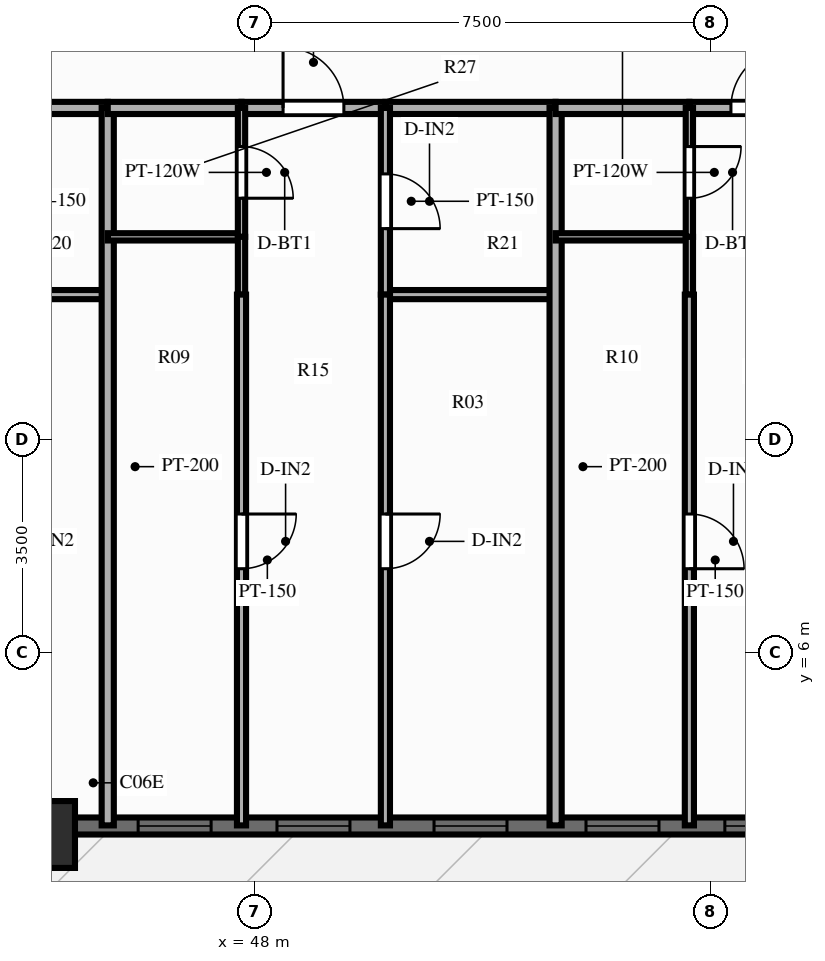
"""IFC4 building model, lengths in metres.
Left out: names, types, materials, properties, quantities, classifications, styles, units other than length and angle.
Written with IfcOpenShell. Run it as: python <this file> out.ifc"""

import sys

from ifc_helpers import new_model, si_unit, direction, frame, frame_2d, origin, origin_2d, place, context, subcontext, project, spatial, rectangle, extrude, source, transform, mapped, element, fill, save


model = new_model("IFC4")
c1 = context("Model", 3, precision=1e-05, world=origin(), true_north=direction((0.0, 1.0)))
c2 = subcontext(c1, "Body", "Model", "MODEL_VIEW")
j1 = project(units=[si_unit("LENGTHUNIT", "METRE"), si_unit("PLANEANGLEUNIT", "RADIAN")], contexts=[c1])
p1 = place(None, origin())
s1 = spatial("IfcSite", under=j1, at=p1, CompositionType="ELEMENT")
p2 = place(p1, origin())
s2 = spatial("IfcBuilding", under=s1, at=p2, CompositionType="ELEMENT")
p3 = place(p2, frame((0.0, 0.0, 22.4)))
s3 = spatial("IfcBuildingStorey", under=s2, at=p3, CompositionType="ELEMENT", Elevation=22.4)
m1 = source(origin(), c2, "Body", "SweptSolid", [
    extrude(rectangle(XDim=1.1, YDim=1.1, at=origin_2d()), origin(), (0.0, 0.0, 1.0), 3.0),
])
p4 = place(p3, frame((44.5, 3.0, 0.0), z_axis=(0.0, 0.0, 1.0), x_axis=(1.0, 0.0, 0.0)))
e1 = element("IfcColumn", 1, at=p4, inside=s3, PredefinedType="COLUMN", context=c2, shape_type="MappedRepresentation", body=[
    mapped(m1, transform((0.0, 0.0, 0.0), scale=1.0)),
])
p5 = place(p3, frame((15.5, 3.14, 0.0), z_axis=(0.0, 0.0, 1.0), x_axis=(1.0, 0.0, 0.0)))
e2 = element("IfcWall", 2, at=p5, inside=s3, PredefinedType="SOLIDWALL", context=c2, shape_type="SweptSolid", body=[
    extrude(rectangle(XDim=45.0, YDim=0.28, at=frame_2d((22.5, 0.0))), origin(), (0.0, 0.0, 1.0), 2.28),
])
p6 = place(p5, frame((0.785, 0.0, 0.25)))
e3 = element("IfcOpeningElement", 3, at=p6, cuts=e2, PredefinedType="OPENING", context=c2, shape_type="SweptSolid", body=[
    extrude(rectangle(XDim=1.2, YDim=1.5, at=frame_2d((0.6, 0.75))), frame((0.0, 0.152, 0.0), z_axis=(0.0, -1.0, 0.0), x_axis=(1.0, 0.0, 0.0)), (0.0, 0.0, 1.0), 0.304),
])
p7 = place(p5, frame((3.033, 0.0, 0.25)))
e4 = element("IfcOpeningElement", 4, at=p7, cuts=e2, PredefinedType="OPENING", context=c2, shape_type="SweptSolid", body=[
    extrude(rectangle(XDim=1.2, YDim=1.5, at=frame_2d((0.6, 0.75))), frame((0.0, 0.152, 0.0), z_axis=(0.0, -1.0, 0.0), x_axis=(1.0, 0.0, 0.0)), (0.0, 0.0, 1.0), 0.304),
])
p8 = place(p5, frame((5.727, 0.0, 0.25)))
e5 = element("IfcOpeningElement", 5, at=p8, cuts=e2, PredefinedType="OPENING", context=c2, shape_type="SweptSolid", body=[
    extrude(rectangle(XDim=1.2, YDim=1.5, at=frame_2d((0.6, 0.75))), frame((0.0, 0.152, 0.0), z_axis=(0.0, -1.0, 0.0), x_axis=(1.0, 0.0, 0.0)), (0.0, 0.0, 1.0), 0.304),
])
p9 = place(p5, frame((8.269, 0.0, 0.25)))
e6 = element("IfcOpeningElement", 6, at=p9, cuts=e2, PredefinedType="OPENING", context=c2, shape_type="SweptSolid", body=[
    extrude(rectangle(XDim=1.2, YDim=1.5, at=frame_2d((0.6, 0.75))), frame((0.0, 0.152, 0.0), z_axis=(0.0, -1.0, 0.0), x_axis=(1.0, 0.0, 0.0)), (0.0, 0.0, 1.0), 0.304),
])
p10 = place(p5, frame((10.621, 0.0, 0.25)))
e7 = element("IfcOpeningElement", 7, at=p10, cuts=e2, PredefinedType="OPENING", context=c2, shape_type="SweptSolid", body=[
    extrude(rectangle(XDim=1.2, YDim=1.5, at=frame_2d((0.6, 0.75))), frame((0.0, 0.152, 0.0), z_axis=(0.0, -1.0, 0.0), x_axis=(1.0, 0.0, 0.0)), (0.0, 0.0, 1.0), 0.304),
])
p11 = place(p5, frame((13.316, 0.0, 0.25)))
e8 = element("IfcOpeningElement", 8, at=p11, cuts=e2, PredefinedType="OPENING", context=c2, shape_type="SweptSolid", body=[
    extrude(rectangle(XDim=1.2, YDim=1.5, at=frame_2d((0.6, 0.75))), frame((0.0, 0.152, 0.0), z_axis=(0.0, -1.0, 0.0), x_axis=(1.0, 0.0, 0.0)), (0.0, 0.0, 1.0), 0.304),
])
p12 = place(p5, frame((16.624, 0.0, 0.25)))
e9 = element("IfcOpeningElement", 9, at=p12, cuts=e2, PredefinedType="OPENING", context=c2, shape_type="SweptSolid", body=[
    extrude(rectangle(XDim=0.7, YDim=1.5, at=frame_2d((0.35, 0.75))), frame((0.0, 0.152, 0.0), z_axis=(0.0, -1.0, 0.0), x_axis=(1.0, 0.0, 0.0)), (0.0, 0.0, 1.0), 0.304),
])
p13 = place(p5, frame((18.141, 0.0, 0.25)))
e10 = element("IfcOpeningElement", 10, at=p13, cuts=e2, PredefinedType="OPENING", context=c2, shape_type="SweptSolid", body=[
    extrude(rectangle(XDim=1.2, YDim=1.5, at=frame_2d((0.6, 0.75))), frame((0.0, 0.152, 0.0), z_axis=(0.0, -1.0, 0.0), x_axis=(1.0, 0.0, 0.0)), (0.0, 0.0, 1.0), 0.304),
])
p14 = place(p5, frame((21.874, 0.0, 0.0), z_axis=(0.0, 0.0, 1.0), x_axis=(-1.0, 0.0, 0.0)))
e11 = element("IfcOpeningElement", 11, at=p14, cuts=e2, PredefinedType="OPENING", context=c2, shape_type="SweptSolid", body=[
    extrude(rectangle(XDim=1.1, YDim=2.15, at=frame_2d((0.55, 1.075))), frame((0.0, 0.152, 0.0), z_axis=(0.0, -1.0, 0.0), x_axis=(1.0, 0.0, 0.0)), (0.0, 0.0, 1.0), 0.304),
])
p15 = place(p5, frame((23.223, 0.0, 0.25)))
e12 = element("IfcOpeningElement", 12, at=p15, cuts=e2, PredefinedType="OPENING", context=c2, shape_type="SweptSolid", body=[
    extrude(rectangle(XDim=1.2, YDim=1.5, at=frame_2d((0.6, 0.75))), frame((0.0, 0.152, 0.0), z_axis=(0.0, -1.0, 0.0), x_axis=(1.0, 0.0, 0.0)), (0.0, 0.0, 1.0), 0.304),
])
p16 = place(p5, frame((25.507, 0.0, 0.25)))
e13 = element("IfcOpeningElement", 13, at=p16, cuts=e2, PredefinedType="OPENING", context=c2, shape_type="SweptSolid", body=[
    extrude(rectangle(XDim=1.2, YDim=1.5, at=frame_2d((0.6, 0.75))), frame((0.0, 0.152, 0.0), z_axis=(0.0, -1.0, 0.0), x_axis=(1.0, 0.0, 0.0)), (0.0, 0.0, 1.0), 0.304),
])
p17 = place(p5, frame((27.6, 0.0, 0.25)))
e14 = element("IfcOpeningElement", 14, at=p17, cuts=e2, PredefinedType="OPENING", context=c2, shape_type="SweptSolid", body=[
    extrude(rectangle(XDim=0.7, YDim=1.5, at=frame_2d((0.35, 0.75))), frame((0.0, 0.152, 0.0), z_axis=(0.0, -1.0, 0.0), x_axis=(1.0, 0.0, 0.0)), (0.0, 0.0, 1.0), 0.304),
])
p18 = place(p5, frame((30.589, 0.0, 0.25)))
e15 = element("IfcOpeningElement", 15, at=p18, cuts=e2, PredefinedType="OPENING", context=c2, shape_type="SweptSolid", body=[
    extrude(rectangle(XDim=1.2, YDim=1.5, at=frame_2d((0.6, 0.75))), frame((0.0, 0.152, 0.0), z_axis=(0.0, -1.0, 0.0), x_axis=(1.0, 0.0, 0.0)), (0.0, 0.0, 1.0), 0.304),
])
p19 = place(p5, frame((32.872, 0.0, 0.25)))
e16 = element("IfcOpeningElement", 16, at=p19, cuts=e2, PredefinedType="OPENING", context=c2, shape_type="SweptSolid", body=[
    extrude(rectangle(XDim=1.2, YDim=1.5, at=frame_2d((0.6, 0.75))), frame((0.0, 0.152, 0.0), z_axis=(0.0, -1.0, 0.0), x_axis=(1.0, 0.0, 0.0)), (0.0, 0.0, 1.0), 0.304),
])
p20 = place(p5, frame((35.455, 0.0, 0.25)))
e17 = element("IfcOpeningElement", 17, at=p20, cuts=e2, PredefinedType="OPENING", context=c2, shape_type="SweptSolid", body=[
    extrude(rectangle(XDim=1.2, YDim=1.5, at=frame_2d((0.6, 0.75))), frame((0.0, 0.152, 0.0), z_axis=(0.0, -1.0, 0.0), x_axis=(1.0, 0.0, 0.0)), (0.0, 0.0, 1.0), 0.304),
])
p21 = place(p5, frame((37.954, 0.0, 0.25)))
e18 = element("IfcOpeningElement", 18, at=p21, cuts=e2, PredefinedType="OPENING", context=c2, shape_type="SweptSolid", body=[
    extrude(rectangle(XDim=1.2, YDim=1.5, at=frame_2d((0.6, 0.75))), frame((0.0, 0.152, 0.0), z_axis=(0.0, -1.0, 0.0), x_axis=(1.0, 0.0, 0.0)), (0.0, 0.0, 1.0), 0.304),
])
p22 = place(p5, frame((40.238, 0.0, 0.25)))
e19 = element("IfcOpeningElement", 19, at=p22, cuts=e2, PredefinedType="OPENING", context=c2, shape_type="SweptSolid", body=[
    extrude(rectangle(XDim=1.2, YDim=1.5, at=frame_2d((0.6, 0.75))), frame((0.0, 0.152, 0.0), z_axis=(0.0, -1.0, 0.0), x_axis=(1.0, 0.0, 0.0)), (0.0, 0.0, 1.0), 0.304),
])
p23 = place(p5, frame((42.716, 0.0, 0.25)))
e20 = element("IfcOpeningElement", 20, at=p23, cuts=e2, PredefinedType="OPENING", context=c2, shape_type="SweptSolid", body=[
    extrude(rectangle(XDim=1.2, YDim=1.5, at=frame_2d((0.6, 0.75))), frame((0.0, 0.152, 0.0), z_axis=(0.0, -1.0, 0.0), x_axis=(1.0, 0.0, 0.0)), (0.0, 0.0, 1.0), 0.304),
])
p24 = place(p3, frame((42.79, 14.95, 0.0), z_axis=(0.0, 0.0, 1.0), x_axis=(1.0, 0.0, 0.0)))
e21 = element("IfcWall", 21, at=p24, inside=s3, PredefinedType="PARTITIONING", context=c2, shape_type="SweptSolid", body=[
    extrude(rectangle(XDim=2.799, YDim=0.2, at=frame_2d((1.399, 0.0))), origin(), (0.0, 0.0, 1.0), 2.79),
])
p25 = place(p3, frame((42.79, 11.88, 0.0), z_axis=(0.0, 0.0, 1.0), x_axis=(1.0, 0.0, 0.0)))
e22 = element("IfcWall", 22, at=p25, inside=s3, PredefinedType="PARTITIONING", context=c2, shape_type="SweptSolid", body=[
    extrude(rectangle(XDim=2.799, YDim=0.15, at=frame_2d((1.399, 0.0))), origin(), (0.0, 0.0, 1.0), 2.79),
])
p26 = place(p3, frame((45.589, 14.95, 0.0), z_axis=(0.0, 0.0, 1.0), x_axis=(0.0, -1.0, 0.0)))
e23 = element("IfcWall", 23, at=p26, inside=s3, PredefinedType="PARTITIONING", context=c2, shape_type="SweptSolid", body=[
    extrude(rectangle(XDim=11.8, YDim=0.2, at=frame_2d((5.9, 0.0))), origin(), (0.0, 0.0, 1.0), 2.24),
])
p27 = place(p3, frame((45.589, 14.95, 0.0), z_axis=(0.0, 0.0, 1.0), x_axis=(1.0, 0.0, 0.0)))
e24 = element("IfcWall", 24, at=p27, inside=s3, PredefinedType="PARTITIONING", context=c2, shape_type="SweptSolid", body=[
    extrude(rectangle(XDim=2.2, YDim=0.2, at=frame_2d((1.1, 0.0))), origin(), (0.0, 0.0, 1.0), 2.79),
])
p28 = place(p3, frame((47.789, 14.95, 0.0), z_axis=(0.0, 0.0, 1.0), x_axis=(1.0, 0.0, 0.0)))
e25 = element("IfcWall", 25, at=p28, inside=s3, PredefinedType="PARTITIONING", context=c2, shape_type="SweptSolid", body=[
    extrude(rectangle(XDim=2.367, YDim=0.2, at=frame_2d((1.183, 0.0))), origin(), (0.0, 0.0, 1.0), 2.79),
])
p29 = place(p28, frame((0.683, 0.0, 0.0)))
e26 = element("IfcOpeningElement", 26, at=p29, cuts=e25, PredefinedType="OPENING", context=c2, shape_type="SweptSolid", body=[
    extrude(rectangle(XDim=1.0, YDim=2.15, at=frame_2d((0.5, 1.075))), frame((0.0, 0.112, 0.0), z_axis=(0.0, -1.0, 0.0), x_axis=(1.0, 0.0, 0.0)), (0.0, 0.0, 1.0), 0.224),
])
p30 = place(p3, frame((50.156, 14.95, 0.0), z_axis=(0.0, 0.0, 1.0), x_axis=(1.0, 0.0, 0.0)))
e27 = element("IfcWall", 27, at=p30, inside=s3, PredefinedType="PARTITIONING", context=c2, shape_type="SweptSolid", body=[
    extrude(rectangle(XDim=2.799, YDim=0.2, at=frame_2d((1.399, 0.0))), origin(), (0.0, 0.0, 1.0), 2.79),
])
p31 = place(p3, frame((45.589, 12.83, 0.0), z_axis=(0.0, 0.0, 1.0), x_axis=(1.0, 0.0, 0.0)))
e28 = element("IfcWall", 28, at=p31, inside=s3, PredefinedType="PARTITIONING", context=c2, shape_type="SweptSolid", body=[
    extrude(rectangle(XDim=2.2, YDim=0.12, at=frame_2d((1.1, 0.0))), origin(), (0.0, 0.0, 1.0), 2.79),
])
p32 = place(p3, frame((50.156, 11.88, 0.0), z_axis=(0.0, 0.0, 1.0), x_axis=(1.0, 0.0, 0.0)))
e29 = element("IfcWall", 29, at=p32, inside=s3, PredefinedType="PARTITIONING", context=c2, shape_type="SweptSolid", body=[
    extrude(rectangle(XDim=2.799, YDim=0.15, at=frame_2d((1.399, 0.0))), origin(), (0.0, 0.0, 1.0), 2.79),
])
p33 = place(p3, frame((47.789, 14.95, 0.0), z_axis=(0.0, 0.0, 1.0), x_axis=(0.0, -1.0, 0.0)))
e30 = element("IfcWall", 30, at=p33, inside=s3, PredefinedType="PARTITIONING", context=c2, shape_type="SweptSolid", body=[
    extrude(rectangle(XDim=2.12, YDim=0.12, at=frame_2d((1.06, 0.0))), origin(), (0.0, 0.0, 1.0), 2.79),
])
p34 = place(p33, frame((0.635, 0.0, 0.0)))
e31 = element("IfcOpeningElement", 31, at=p34, cuts=e30, PredefinedType="OPENING", context=c2, shape_type="SweptSolid", body=[
    extrude(rectangle(XDim=0.85, YDim=2.05, at=frame_2d((0.425, 1.025))), frame((0.0, 0.072, 0.0), z_axis=(0.0, -1.0, 0.0), x_axis=(1.0, 0.0, 0.0)), (0.0, 0.0, 1.0), 0.144),
])
p35 = place(p3, frame((47.789, 12.83, 0.0), z_axis=(0.0, 0.0, 1.0), x_axis=(0.0, -1.0, 0.0)))
e32 = element("IfcWall", 32, at=p35, inside=s3, PredefinedType="PARTITIONING", context=c2, shape_type="SweptSolid", body=[
    extrude(rectangle(XDim=0.95, YDim=0.12, at=frame_2d((0.475, 0.0))), origin(), (0.0, 0.0, 1.0), 2.79),
])
p36 = place(p3, frame((47.789, 11.88, 0.0), z_axis=(0.0, 0.0, 1.0), x_axis=(0.0, -1.0, 0.0)))
e33 = element("IfcWall", 33, at=p36, inside=s3, PredefinedType="PARTITIONING", context=c2, shape_type="SweptSolid", body=[
    extrude(rectangle(XDim=8.73, YDim=0.15, at=frame_2d((4.365, 0.0))), origin(), (0.0, 0.0, 1.0), 2.79),
])
p37 = place(p36, frame((3.609, 0.0, 0.0)))
e34 = element("IfcOpeningElement", 34, at=p37, cuts=e33, PredefinedType="OPENING", context=c2, shape_type="SweptSolid", body=[
    extrude(rectangle(XDim=0.9, YDim=2.1, at=frame_2d((0.45, 1.05))), frame((0.0, 0.087, 0.0), z_axis=(0.0, -1.0, 0.0), x_axis=(1.0, 0.0, 0.0)), (0.0, 0.0, 1.0), 0.174),
])
p38 = place(p3, frame((50.156, 14.95, 0.0), z_axis=(0.0, 0.0, 1.0), x_axis=(0.0, -1.0, 0.0)))
e35 = element("IfcWall", 35, at=p38, inside=s3, PredefinedType="PARTITIONING", context=c2, shape_type="SweptSolid", body=[
    extrude(rectangle(XDim=3.07, YDim=0.15, at=frame_2d((1.535, 0.0))), origin(), (0.0, 0.0, 1.0), 2.79),
])
p39 = place(p38, frame((1.085, 0.0, 0.0)))
e36 = element("IfcOpeningElement", 36, at=p39, cuts=e35, PredefinedType="OPENING", context=c2, shape_type="SweptSolid", body=[
    extrude(rectangle(XDim=0.9, YDim=2.1, at=frame_2d((0.45, 1.05))), frame((0.0, 0.087, 0.0), z_axis=(0.0, -1.0, 0.0), x_axis=(1.0, 0.0, 0.0)), (0.0, 0.0, 1.0), 0.174),
])
p40 = place(p3, frame((50.156, 11.88, 0.0), z_axis=(0.0, 0.0, 1.0), x_axis=(0.0, -1.0, 0.0)))
e37 = element("IfcWall", 37, at=p40, inside=s3, PredefinedType="PARTITIONING", context=c2, shape_type="SweptSolid", body=[
    extrude(rectangle(XDim=8.73, YDim=0.15, at=frame_2d((4.365, 0.0))), origin(), (0.0, 0.0, 1.0), 2.79),
])
p41 = place(p40, frame((3.609, 0.0, 0.0)))
e38 = element("IfcOpeningElement", 38, at=p41, cuts=e37, PredefinedType="OPENING", context=c2, shape_type="SweptSolid", body=[
    extrude(rectangle(XDim=0.9, YDim=2.1, at=frame_2d((0.45, 1.05))), frame((0.0, 0.087, 0.0), z_axis=(0.0, -1.0, 0.0), x_axis=(1.0, 0.0, 0.0)), (0.0, 0.0, 1.0), 0.174),
])
p42 = place(p3, frame((52.954, 14.95, 0.0), z_axis=(0.0, 0.0, 1.0), x_axis=(0.0, -1.0, 0.0)))
e39 = element("IfcWall", 39, at=p42, inside=s3, PredefinedType="PARTITIONING", context=c2, shape_type="SweptSolid", body=[
    extrude(rectangle(XDim=11.8, YDim=0.2, at=frame_2d((5.9, 0.0))), origin(), (0.0, 0.0, 1.0), 2.79),
])
p43 = place(p3, frame((52.954, 14.95, 0.0), z_axis=(0.0, 0.0, 1.0), x_axis=(1.0, 0.0, 0.0)))
e40 = element("IfcWall", 40, at=p43, inside=s3, PredefinedType="PARTITIONING", context=c2, shape_type="SweptSolid", body=[
    extrude(rectangle(XDim=2.2, YDim=0.2, at=frame_2d((1.1, 0.0))), origin(), (0.0, 0.0, 1.0), 2.79),
])
p44 = place(p3, frame((55.154, 14.95, 0.0), z_axis=(0.0, 0.0, 1.0), x_axis=(1.0, 0.0, 0.0)))
e41 = element("IfcWall", 41, at=p44, inside=s3, PredefinedType="PARTITIONING", context=c2, shape_type="SweptSolid", body=[
    extrude(rectangle(XDim=2.367, YDim=0.2, at=frame_2d((1.183, 0.0))), origin(), (0.0, 0.0, 1.0), 2.79),
])
p45 = place(p44, frame((0.683, 0.0, 0.0)))
e42 = element("IfcOpeningElement", 42, at=p45, cuts=e41, PredefinedType="OPENING", context=c2, shape_type="SweptSolid", body=[
    extrude(rectangle(XDim=1.0, YDim=2.15, at=frame_2d((0.5, 1.075))), frame((0.0, 0.112, 0.0), z_axis=(0.0, -1.0, 0.0), x_axis=(1.0, 0.0, 0.0)), (0.0, 0.0, 1.0), 0.224),
])
p46 = place(p3, frame((52.954, 12.83, 0.0), z_axis=(0.0, 0.0, 1.0), x_axis=(1.0, 0.0, 0.0)))
e43 = element("IfcWall", 43, at=p46, inside=s3, PredefinedType="PARTITIONING", context=c2, shape_type="SweptSolid", body=[
    extrude(rectangle(XDim=2.2, YDim=0.12, at=frame_2d((1.1, 0.0))), origin(), (0.0, 0.0, 1.0), 2.79),
])
p47 = place(p3, frame((55.154, 14.95, 0.0), z_axis=(0.0, 0.0, 1.0), x_axis=(0.0, -1.0, 0.0)))
e44 = element("IfcWall", 44, at=p47, inside=s3, PredefinedType="PARTITIONING", context=c2, shape_type="SweptSolid", body=[
    extrude(rectangle(XDim=2.12, YDim=0.12, at=frame_2d((1.06, 0.0))), origin(), (0.0, 0.0, 1.0), 2.79),
])
p48 = place(p47, frame((0.635, 0.0, 0.0)))
e45 = element("IfcOpeningElement", 45, at=p48, cuts=e44, PredefinedType="OPENING", context=c2, shape_type="SweptSolid", body=[
    extrude(rectangle(XDim=0.85, YDim=2.05, at=frame_2d((0.425, 1.025))), frame((0.0, 0.072, 0.0), z_axis=(0.0, -1.0, 0.0), x_axis=(1.0, 0.0, 0.0)), (0.0, 0.0, 1.0), 0.144),
])
p49 = place(p3, frame((55.154, 12.83, 0.0), z_axis=(0.0, 0.0, 1.0), x_axis=(0.0, -1.0, 0.0)))
e46 = element("IfcWall", 46, at=p49, inside=s3, PredefinedType="PARTITIONING", context=c2, shape_type="SweptSolid", body=[
    extrude(rectangle(XDim=0.95, YDim=0.12, at=frame_2d((0.475, 0.0))), origin(), (0.0, 0.0, 1.0), 2.79),
])
p50 = place(p3, frame((55.154, 11.88, 0.0), z_axis=(0.0, 0.0, 1.0), x_axis=(0.0, -1.0, 0.0)))
e47 = element("IfcWall", 47, at=p50, inside=s3, PredefinedType="PARTITIONING", context=c2, shape_type="SweptSolid", body=[
    extrude(rectangle(XDim=8.73, YDim=0.15, at=frame_2d((4.365, 0.0))), origin(), (0.0, 0.0, 1.0), 2.79),
])
p51 = place(p50, frame((3.609, 0.0, 0.0)))
e48 = element("IfcOpeningElement", 48, at=p51, cuts=e47, PredefinedType="OPENING", context=c2, shape_type="SweptSolid", body=[
    extrude(rectangle(XDim=0.9, YDim=2.1, at=frame_2d((0.45, 1.05))), frame((0.0, 0.087, 0.0), z_axis=(0.0, -1.0, 0.0), x_axis=(1.0, 0.0, 0.0)), (0.0, 0.0, 1.0), 0.174),
])
m2 = source(origin(), c2, "Body", "SweptSolid", [
    extrude(rectangle(XDim=1.2, YDim=1.5, at=frame_2d((0.6, 0.75))), frame((0.0, 0.03, 0.0), z_axis=(0.0, -1.0, 0.0), x_axis=(1.0, 0.0, 0.0)), (0.0, 0.0, 1.0), 0.06),
])
p52 = place(p18, origin())
e49 = element("IfcWindow", 49, at=p52, inside=s3, PartitioningType="SINGLE_PANEL", PredefinedType="WINDOW", context=c2, shape_type="MappedRepresentation", body=[
    mapped(m2, transform((0.0, 0.0, 0.0), scale=1.0)),
])
fill(e15, e49)
p53 = place(p19, origin())
e50 = element("IfcWindow", 50, at=p53, inside=s3, PartitioningType="SINGLE_PANEL", PredefinedType="WINDOW", context=c2, shape_type="MappedRepresentation", body=[
    mapped(m2, transform((0.0, 0.0, 0.0), scale=1.0)),
])
fill(e16, e50)
p54 = place(p20, origin())
e51 = element("IfcWindow", 51, at=p54, inside=s3, PartitioningType="SINGLE_PANEL", PredefinedType="WINDOW", context=c2, shape_type="MappedRepresentation", body=[
    mapped(m2, transform((0.0, 0.0, 0.0), scale=1.0)),
])
fill(e17, e51)
p55 = place(p21, origin())
e52 = element("IfcWindow", 52, at=p55, inside=s3, PartitioningType="SINGLE_PANEL", PredefinedType="WINDOW", context=c2, shape_type="MappedRepresentation", body=[
    mapped(m2, transform((0.0, 0.0, 0.0), scale=1.0)),
])
fill(e18, e52)
p56 = place(p22, origin())
e53 = element("IfcWindow", 53, at=p56, inside=s3, PartitioningType="SINGLE_PANEL", PredefinedType="WINDOW", context=c2, shape_type="MappedRepresentation", body=[
    mapped(m2, transform((0.0, 0.0, 0.0), scale=1.0)),
])
fill(e19, e53)
m3 = source(origin(), c2, "Body", "SweptSolid", [
    extrude(rectangle(XDim=1.0, YDim=2.15, at=frame_2d((0.5, 1.075))), frame((0.0, 0.025, 0.0), z_axis=(0.0, -1.0, 0.0), x_axis=(1.0, 0.0, 0.0)), (0.0, 0.0, 1.0), 0.05),
])
p57 = place(p29, origin())
e54 = element("IfcDoor", 54, at=p57, inside=s3, OperationType="SINGLE_SWING_LEFT", PredefinedType="DOOR", context=c2, shape_type="MappedRepresentation", body=[
    mapped(m3, transform((0.0, 0.0, 0.0), scale=1.0)),
])
fill(e26, e54)
m4 = source(origin(), c2, "Body", "SweptSolid", [
    extrude(rectangle(XDim=0.85, YDim=2.05, at=frame_2d((0.425, 1.025))), frame((0.0, 0.025, 0.0), z_axis=(0.0, -1.0, 0.0), x_axis=(1.0, 0.0, 0.0)), (0.0, 0.0, 1.0), 0.05),
])
p58 = place(p34, origin())
e55 = element("IfcDoor", 55, at=p58, inside=s3, OperationType="SINGLE_SWING_RIGHT", PredefinedType="DOOR", context=c2, shape_type="MappedRepresentation", body=[
    mapped(m4, transform((0.0, 0.0, 0.0), scale=1.0)),
])
fill(e31, e55)
m5 = source(origin(), c2, "Body", "SweptSolid", [
    extrude(rectangle(XDim=0.9, YDim=2.1, at=frame_2d((0.45, 1.05))), frame((0.0, 0.025, 0.0), z_axis=(0.0, -1.0, 0.0), x_axis=(1.0, 0.0, 0.0)), (0.0, 0.0, 1.0), 0.05),
])
p59 = place(p37, origin())
e56 = element("IfcDoor", 56, at=p59, inside=s3, OperationType="SINGLE_SWING_LEFT", PredefinedType="DOOR", context=c2, shape_type="MappedRepresentation", body=[
    mapped(m5, transform((0.0, 0.0, 0.0), scale=1.0)),
])
fill(e34, e56)
p60 = place(p39, origin())
e57 = element("IfcDoor", 57, at=p60, inside=s3, OperationType="SINGLE_SWING_RIGHT", PredefinedType="DOOR", context=c2, shape_type="MappedRepresentation", body=[
    mapped(m5, transform((0.0, 0.0, 0.0), scale=1.0)),
])
fill(e36, e57)
p61 = place(p41, origin())
e58 = element("IfcDoor", 58, at=p61, inside=s3, OperationType="SINGLE_SWING_LEFT", PredefinedType="DOOR", context=c2, shape_type="MappedRepresentation", body=[
    mapped(m5, transform((0.0, 0.0, 0.0), scale=1.0)),
])
fill(e38, e58)
p62 = place(p45, origin())
e59 = element("IfcDoor", 59, at=p62, inside=s3, OperationType="SINGLE_SWING_RIGHT", PredefinedType="DOOR", context=c2, shape_type="MappedRepresentation", body=[
    mapped(m3, transform((0.0, 0.0, 0.0), scale=1.0)),
])
fill(e42, e59)
p63 = place(p48, origin())
e60 = element("IfcDoor", 60, at=p63, inside=s3, OperationType="SINGLE_SWING_LEFT", PredefinedType="DOOR", context=c2, shape_type="MappedRepresentation", body=[
    mapped(m4, transform((0.0, 0.0, 0.0), scale=1.0)),
])
fill(e45, e60)
p64 = place(p51, origin())
e61 = element("IfcDoor", 61, at=p64, inside=s3, OperationType="SINGLE_SWING_RIGHT", PredefinedType="DOOR", context=c2, shape_type="MappedRepresentation", body=[
    mapped(m5, transform((0.0, 0.0, 0.0), scale=1.0)),
])
fill(e48, e61)
save(model, sys.argv[1])
